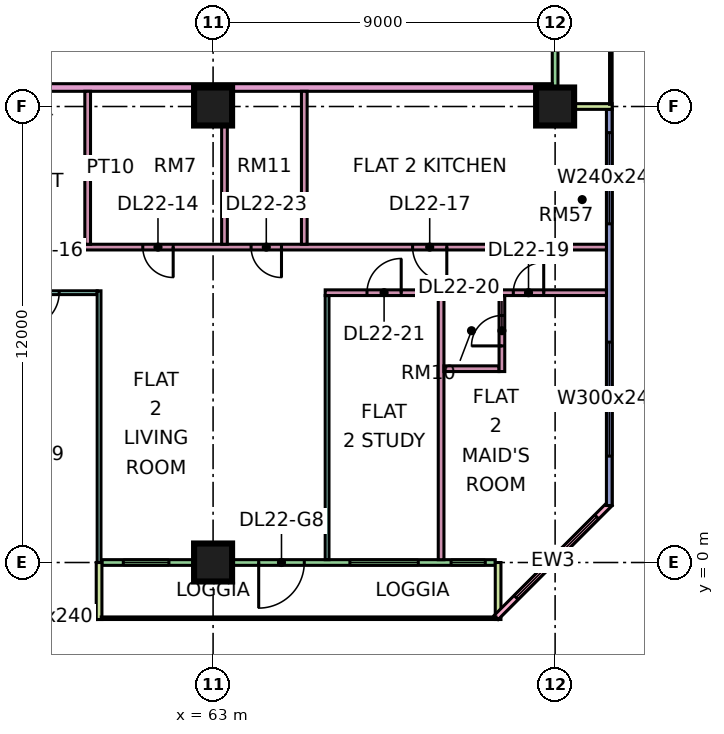
"""IFC4 building model, lengths in metres.
Left out: names, types, materials, properties, quantities, classifications, styles, units other than length and angle.
Written with IfcOpenShell. Run it as: python <this file> out.ifc"""

import sys

from ifc_helpers import new_model, si_unit, direction, frame, frame_2d, origin, origin_2d, place, context, subcontext, project, spatial, rectangle, extrude, element, fill, save


model = new_model("IFC4")
c1 = context("Model", 3, precision=1e-05, world=origin(), true_north=direction((0.0, 1.0)))
c2 = subcontext(c1, "Body", "Model", "MODEL_VIEW")
j1 = project(units=[si_unit("LENGTHUNIT", "METRE"), si_unit("PLANEANGLEUNIT", "RADIAN")], contexts=[c1])
p1 = place(None, origin())
s1 = spatial("IfcSite", under=j1, at=p1, CompositionType="ELEMENT")
p2 = place(p1, origin())
s2 = spatial("IfcBuilding", under=s1, at=p2, CompositionType="ELEMENT")
p3 = place(p2, frame((0.0, 0.0, 99.4)))
s3 = spatial("IfcBuildingStorey", under=s2, at=p3, CompositionType="ELEMENT", Elevation=99.4)
for number, where, z_axis, x_axis in (
    (1, (63.0, 0.0, 0.0), (0.0, 0.0, 1.0), (1.0, 0.0, 0.0)),
    (2, (63.0, 12.0, 0.0), (0.0, 0.0, 1.0), (1.0, 0.0, 0.0)),
    (3, (72.0, 12.0, 0.0), (0.0, 0.0, 1.0), (1.0, 0.0, 0.0)),
):
    element("IfcColumn", number, at=place(p3, frame(where, z_axis=z_axis, x_axis=x_axis)), inside=s3, PredefinedType="COLUMN", context=c2, shape_type="SweptSolid", body=[
        extrude(rectangle(XDim=1.0, YDim=1.0, at=origin_2d()), origin(), (0.0, 0.0, 1.0), 3.75),
    ])
p4 = place(p3, frame((48.075, -1.425, 0.0), z_axis=(0.0, 0.0, 1.0), x_axis=(1.0, 0.0, 0.0)))
e4 = element("IfcWall", 4, at=p4, inside=s3, PredefinedType="SOLIDWALL", context=c2, shape_type="SweptSolid", body=[
    extrude(rectangle(XDim=11.85, YDim=0.15, at=frame_2d((5.925, 0.0))), origin(), (0.0, 0.0, 1.0), 3.35),
])
p5 = place(p4, frame((0.562, 0.0, 0.45)))
e5 = element("IfcOpeningElement", 5, at=p5, cuts=e4, PredefinedType="OPENING", context=c2, shape_type="SweptSolid", body=[
    extrude(rectangle(XDim=1.8, YDim=2.4, at=frame_2d((0.9, 1.2))), frame((0.0, 0.085, 0.0), z_axis=(0.0, -1.0, 0.0), x_axis=(1.0, 0.0, 0.0)), (0.0, 0.0, 1.0), 0.17),
])
p6 = place(p4, frame((3.525, 0.0, 0.45)))
e6 = element("IfcOpeningElement", 6, at=p6, cuts=e4, PredefinedType="OPENING", context=c2, shape_type="SweptSolid", body=[
    extrude(rectangle(XDim=1.8, YDim=2.4, at=frame_2d((0.9, 1.2))), frame((0.0, 0.085, 0.0), z_axis=(0.0, -1.0, 0.0), x_axis=(1.0, 0.0, 0.0)), (0.0, 0.0, 1.0), 0.17),
])
p7 = place(p4, frame((6.525, 0.0, 0.45)))
e7 = element("IfcOpeningElement", 7, at=p7, cuts=e4, PredefinedType="OPENING", context=c2, shape_type="SweptSolid", body=[
    extrude(rectangle(XDim=1.8, YDim=2.4, at=frame_2d((0.9, 1.2))), frame((0.0, 0.085, 0.0), z_axis=(0.0, -1.0, 0.0), x_axis=(1.0, 0.0, 0.0)), (0.0, 0.0, 1.0), 0.17),
])
p8 = place(p4, frame((9.488, 0.0, 0.45)))
e8 = element("IfcOpeningElement", 8, at=p8, cuts=e4, PredefinedType="OPENING", context=c2, shape_type="SweptSolid", body=[
    extrude(rectangle(XDim=1.8, YDim=2.4, at=frame_2d((0.9, 1.2))), frame((0.0, 0.085, 0.0), z_axis=(0.0, -1.0, 0.0), x_axis=(1.0, 0.0, 0.0)), (0.0, 0.0, 1.0), 0.17),
])
p9 = place(p3, frame((60.075, 0.0, 0.0), z_axis=(0.0, 0.0, 1.0), x_axis=(1.0, 0.0, 0.0)))
e9 = element("IfcWall", 9, at=p9, inside=s3, PredefinedType="SOLIDWALL", context=c2, shape_type="SweptSolid", body=[
    extrude(rectangle(XDim=10.35, YDim=0.15, at=frame_2d((5.175, 0.0))), origin(), (0.0, 0.0, 1.0), 3.35),
])
p10 = place(p9, frame((0.562, 0.0, 0.45)))
e10 = element("IfcOpeningElement", 10, at=p10, cuts=e9, PredefinedType="OPENING", context=c2, shape_type="SweptSolid", body=[
    extrude(rectangle(XDim=1.2, YDim=2.4, at=frame_2d((0.6, 1.2))), frame((0.0, 0.085, 0.0), z_axis=(0.0, -1.0, 0.0), x_axis=(1.0, 0.0, 0.0)), (0.0, 0.0, 1.0), 0.17),
])
p11 = place(p9, frame((4.125, 0.0, 0.0)))
e11 = element("IfcOpeningElement", 11, at=p11, cuts=e9, PredefinedType="OPENING", context=c2, shape_type="SweptSolid", body=[
    extrude(rectangle(XDim=1.2, YDim=2.4, at=frame_2d((0.6, 1.2))), frame((0.0, 0.085, 0.0), z_axis=(0.0, -1.0, 0.0), x_axis=(1.0, 0.0, 0.0)), (0.0, 0.0, 1.0), 0.17),
])
p12 = place(p9, frame((6.525, 0.0, 0.45)))
e12 = element("IfcOpeningElement", 12, at=p12, cuts=e9, PredefinedType="OPENING", context=c2, shape_type="SweptSolid", body=[
    extrude(rectangle(XDim=1.8, YDim=2.4, at=frame_2d((0.9, 1.2))), frame((0.0, 0.085, 0.0), z_axis=(0.0, -1.0, 0.0), x_axis=(1.0, 0.0, 0.0)), (0.0, 0.0, 1.0), 0.17),
])
p13 = place(p9, frame((9.188, 0.0, 0.45)))
e13 = element("IfcOpeningElement", 13, at=p13, cuts=e9, PredefinedType="OPENING", context=c2, shape_type="SweptSolid", body=[
    extrude(rectangle(XDim=0.9, YDim=2.4, at=frame_2d((0.45, 1.2))), frame((0.0, 0.085, 0.0), z_axis=(0.0, -1.0, 0.0), x_axis=(1.0, 0.0, 0.0)), (0.0, 0.0, 1.0), 0.17),
])
for number, where, z_axis, x_axis in (
    (14, (60.0, -1.5, 0.0), (0.0, 0.0, 1.0), (0.0, 1.0, 0.0)),
    (15, (70.5, -1.5, 0.0), (0.0, 0.0, 1.0), (0.0, 1.0, 0.0)),
):
    element("IfcWall", number, at=place(p3, frame(where, z_axis=z_axis, x_axis=x_axis)), inside=s3, PredefinedType="SOLIDWALL", context=c2, shape_type="SweptSolid", body=[
        extrude(rectangle(XDim=1.5, YDim=0.15, at=frame_2d((0.75, 0.0))), origin(), (0.0, 0.0, 1.0), 3.35),
    ])
p14 = place(p3, frame((70.447, -1.447, 0.0), z_axis=(0.0, 0.0, 1.0), x_axis=(0.707106781187, 0.707106781187, 0.0)))
e16 = element("IfcWall", 16, at=p14, inside=s3, PredefinedType="SOLIDWALL", context=c2, shape_type="SweptSolid", body=[
    extrude(rectangle(XDim=4.243, YDim=0.15, at=frame_2d((2.121, 0.0))), origin(), (0.0, 0.0, 1.0), 3.35),
])
p15 = place(p14, frame((0.744, 0.0, 0.45)))
e17 = element("IfcOpeningElement", 17, at=p15, cuts=e16, PredefinedType="OPENING", context=c2, shape_type="SweptSolid", body=[
    extrude(rectangle(XDim=3.0, YDim=2.4, at=frame_2d((1.5, 1.2))), frame((0.0, 0.085, 0.0), z_axis=(0.0, -1.0, 0.0), x_axis=(1.0, 0.0, 0.0)), (0.0, 0.0, 1.0), 0.17),
])
p16 = place(p3, frame((73.425, 1.5, 0.0), z_axis=(0.0, 0.0, 1.0), x_axis=(0.0, 1.0, 0.0)))
e18 = element("IfcWall", 18, at=p16, inside=s3, PredefinedType="SOLIDWALL", context=c2, shape_type="SweptSolid", body=[
    extrude(rectangle(XDim=10.425, YDim=0.15, at=frame_2d((5.212, 0.0))), origin(), (0.0, 0.0, 1.0), 3.35),
])
p17 = place(p16, frame((1.3, 0.0, 0.45)))
e19 = element("IfcOpeningElement", 19, at=p17, cuts=e18, PredefinedType="OPENING", context=c2, shape_type="SweptSolid", body=[
    extrude(rectangle(XDim=3.0, YDim=2.4, at=frame_2d((1.5, 1.2))), frame((0.0, 0.085, 0.0), z_axis=(0.0, -1.0, 0.0), x_axis=(1.0, 0.0, 0.0)), (0.0, 0.0, 1.0), 0.17),
])
p18 = place(p16, frame((7.413, 0.0, 0.45)))
e20 = element("IfcOpeningElement", 20, at=p18, cuts=e18, PredefinedType="OPENING", context=c2, shape_type="SweptSolid", body=[
    extrude(rectangle(XDim=2.4, YDim=2.4, at=frame_2d((1.2, 1.2))), frame((0.0, 0.085, 0.0), z_axis=(0.0, -1.0, 0.0), x_axis=(1.0, 0.0, 0.0)), (0.0, 0.0, 1.0), 0.17),
])
p19 = place(p3, frame((72.0, 12.075, 0.0), z_axis=(0.0, 0.0, 1.0), x_axis=(0.0, 1.0, 0.0)))
e21 = element("IfcWall", 21, at=p19, inside=s3, PredefinedType="SOLIDWALL", context=c2, shape_type="SweptSolid", body=[
    extrude(rectangle(XDim=10.35, YDim=0.15, at=frame_2d((5.175, 0.0))), origin(), (0.0, 0.0, 1.0), 3.35),
])
p20 = place(p19, frame((4.575, 0.0, 0.0)))
e22 = element("IfcOpeningElement", 22, at=p20, cuts=e21, PredefinedType="OPENING", context=c2, shape_type="SweptSolid", body=[
    extrude(rectangle(XDim=1.8, YDim=2.4, at=frame_2d((0.9, 1.2))), frame((0.0, 0.085, 0.0), z_axis=(0.0, -1.0, 0.0), x_axis=(1.0, 0.0, 0.0)), (0.0, 0.0, 1.0), 0.17),
])
p21 = place(p19, frame((7.988, 0.0, 0.45)))
e23 = element("IfcOpeningElement", 23, at=p21, cuts=e21, PredefinedType="OPENING", context=c2, shape_type="SweptSolid", body=[
    extrude(rectangle(XDim=1.8, YDim=2.4, at=frame_2d((0.9, 1.2))), frame((0.0, 0.085, 0.0), z_axis=(0.0, -1.0, 0.0), x_axis=(1.0, 0.0, 0.0)), (0.0, 0.0, 1.0), 0.17),
])
p22 = place(p3, frame((73.5, 12.0, 0.0), z_axis=(0.0, 0.0, 1.0), x_axis=(-1.0, 0.0, 0.0)))
e24 = element("IfcWall", 24, at=p22, inside=s3, PredefinedType="SOLIDWALL", context=c2, shape_type="SweptSolid", body=[
    extrude(rectangle(XDim=1.5, YDim=0.15, at=frame_2d((0.75, 0.0))), origin(), (0.0, 0.0, 1.0), 3.35),
])
p23 = place(p3, frame((40.65, 12.5, 0.0), z_axis=(0.0, 0.0, 1.0), x_axis=(1.0, 0.0, 0.0)))
e25 = element("IfcWall", 25, at=p23, inside=s3, PredefinedType="PARTITIONING", context=c2, shape_type="SweptSolid", body=[
    extrude(rectangle(XDim=31.276, YDim=0.2, at=frame_2d((15.638, 0.0))), origin(), (0.0, 0.0, 1.0), 3.35),
])
p24 = place(p23, frame((14.25, 0.0, 0.0)))
e26 = element("IfcOpeningElement", 26, at=p24, cuts=e25, PredefinedType="OPENING", context=c2, shape_type="SweptSolid", body=[
    extrude(rectangle(XDim=1.0, YDim=2.1, at=frame_2d((0.5, 1.05))), frame((0.0, 0.11, 0.0), z_axis=(0.0, -1.0, 0.0), x_axis=(1.0, 0.0, 0.0)), (0.0, 0.0, 1.0), 0.22),
])
p25 = place(p23, frame((1.05, 0.0, 0.0)))
e27 = element("IfcOpeningElement", 27, at=p25, cuts=e25, PredefinedType="OPENING", context=c2, shape_type="SweptSolid", body=[
    extrude(rectangle(XDim=1.0, YDim=2.1, at=frame_2d((0.5, 1.05))), frame((0.0, 0.11, 0.0), z_axis=(0.0, -1.0, 0.0), x_axis=(1.0, 0.0, 0.0)), (0.0, 0.0, 1.0), 0.22),
])
p26 = place(p3, frame((54.1, 7.1, 0.0), z_axis=(0.0, 0.0, 1.0), x_axis=(1.0, 0.0, 0.0)))
e28 = element("IfcWall", 28, at=p26, inside=s3, PredefinedType="PARTITIONING", context=c2, shape_type="SweptSolid", body=[
    extrude(rectangle(XDim=5.85, YDim=0.1, at=frame_2d((2.925, 0.0))), origin(), (0.0, 0.0, 1.0), 3.35),
])
p27 = place(p26, frame((0.95, 0.0, 0.0)))
e29 = element("IfcOpeningElement", 29, at=p27, cuts=e28, PredefinedType="OPENING", context=c2, shape_type="SweptSolid", body=[
    extrude(rectangle(XDim=0.9, YDim=2.1, at=frame_2d((0.45, 1.05))), frame((0.0, 0.06, 0.0), z_axis=(0.0, -1.0, 0.0), x_axis=(1.0, 0.0, 0.0)), (0.0, 0.0, 1.0), 0.12),
])
p28 = place(p26, frame((3.95, 0.0, 0.0)))
e30 = element("IfcOpeningElement", 30, at=p28, cuts=e28, PredefinedType="OPENING", context=c2, shape_type="SweptSolid", body=[
    extrude(rectangle(XDim=0.9, YDim=2.1, at=frame_2d((0.45, 1.05))), frame((0.0, 0.06, 0.0), z_axis=(0.0, -1.0, 0.0), x_axis=(1.0, 0.0, 0.0)), (0.0, 0.0, 1.0), 0.12),
])
p29 = place(p3, frame((56.625, 8.3, 0.0), z_axis=(0.0, 0.0, 1.0), x_axis=(1.0, 0.0, 0.0)))
e31 = element("IfcWall", 31, at=p29, inside=s3, PredefinedType="PARTITIONING", context=c2, shape_type="SweptSolid", body=[
    extrude(rectangle(XDim=16.725, YDim=0.15, at=frame_2d((8.363, 0.0))), origin(), (0.0, 0.0, 1.0), 3.35),
])
p30 = place(p29, frame((4.525, 0.0, 0.0)))
e32 = element("IfcOpeningElement", 32, at=p30, cuts=e31, PredefinedType="OPENING", context=c2, shape_type="SweptSolid", body=[
    extrude(rectangle(XDim=0.8, YDim=2.1, at=frame_2d((0.4, 1.05))), frame((0.0, 0.085, 0.0), z_axis=(0.0, -1.0, 0.0), x_axis=(1.0, 0.0, 0.0)), (0.0, 0.0, 1.0), 0.17),
])
p31 = place(p29, frame((11.625, 0.0, 0.0)))
e33 = element("IfcOpeningElement", 33, at=p31, cuts=e31, PredefinedType="OPENING", context=c2, shape_type="SweptSolid", body=[
    extrude(rectangle(XDim=0.9, YDim=2.1, at=frame_2d((0.45, 1.05))), frame((0.0, 0.085, 0.0), z_axis=(0.0, -1.0, 0.0), x_axis=(1.0, 0.0, 0.0)), (0.0, 0.0, 1.0), 0.17),
])
p32 = place(p29, frame((7.375, 0.0, 0.0)))
e34 = element("IfcOpeningElement", 34, at=p32, cuts=e31, PredefinedType="OPENING", context=c2, shape_type="SweptSolid", body=[
    extrude(rectangle(XDim=0.8, YDim=2.1, at=frame_2d((0.4, 1.05))), frame((0.0, 0.085, 0.0), z_axis=(0.0, -1.0, 0.0), x_axis=(1.0, 0.0, 0.0)), (0.0, 0.0, 1.0), 0.17),
])
p33 = place(p3, frame((59.7, 8.375, 0.0), z_axis=(0.0, 0.0, 1.0), x_axis=(0.0, 1.0, 0.0)))
e35 = element("IfcWall", 35, at=p33, inside=s3, PredefinedType="PARTITIONING", context=c2, shape_type="SweptSolid", body=[
    extrude(rectangle(XDim=4.025, YDim=0.15, at=frame_2d((2.012, 0.0))), origin(), (0.0, 0.0, 1.0), 3.35),
])
p34 = place(p3, frame((60.0, 0.0, 0.0), z_axis=(0.0, 0.0, 1.0), x_axis=(0.0, 1.0, 0.0)))
e36 = element("IfcWall", 36, at=p34, inside=s3, PredefinedType="PARTITIONING", context=c2, shape_type="SweptSolid", body=[
    extrude(rectangle(XDim=7.15, YDim=0.1, at=frame_2d((3.575, 0.0))), origin(), (0.0, 0.0, 1.0), 3.35),
])
for number, where, z_axis, x_axis in (
    (37, (63.3, 8.375, 0.0), (0.0, 0.0, 1.0), (0.0, 1.0, 0.0)),
    (38, (65.4, 8.375, 0.0), (0.0, 0.0, 1.0), (0.0, 1.0, 0.0)),
):
    element("IfcWall", number, at=place(p3, frame(where, z_axis=z_axis, x_axis=x_axis)), inside=s3, PredefinedType="PARTITIONING", context=c2, shape_type="SweptSolid", body=[
        extrude(rectangle(XDim=4.025, YDim=0.15, at=frame_2d((2.012, 0.0))), origin(), (0.0, 0.0, 1.0), 3.35),
    ])
p35 = place(p3, frame((65.95, 7.1, 0.0), z_axis=(0.0, 0.0, 1.0), x_axis=(1.0, 0.0, 0.0)))
e39 = element("IfcWall", 39, at=p35, inside=s3, PredefinedType="PARTITIONING", context=c2, shape_type="SweptSolid", body=[
    extrude(rectangle(XDim=7.4, YDim=0.15, at=frame_2d((3.7, 0.0))), origin(), (0.0, 0.0, 1.0), 3.35),
])
p36 = place(p35, frame((4.95, 0.0, 0.0)))
e40 = element("IfcOpeningElement", 40, at=p36, cuts=e39, PredefinedType="OPENING", context=c2, shape_type="SweptSolid", body=[
    extrude(rectangle(XDim=0.8, YDim=2.1, at=frame_2d((0.4, 1.05))), frame((0.0, 0.085, 0.0), z_axis=(0.0, -1.0, 0.0), x_axis=(1.0, 0.0, 0.0)), (0.0, 0.0, 1.0), 0.17),
])
p37 = place(p35, frame((1.1, 0.0, 0.0)))
e41 = element("IfcOpeningElement", 41, at=p37, cuts=e39, PredefinedType="OPENING", context=c2, shape_type="SweptSolid", body=[
    extrude(rectangle(XDim=0.9, YDim=2.1, at=frame_2d((0.45, 1.05))), frame((0.0, 0.085, 0.0), z_axis=(0.0, -1.0, 0.0), x_axis=(1.0, 0.0, 0.0)), (0.0, 0.0, 1.0), 0.17),
])
p38 = place(p3, frame((66.0, 0.074, 0.0), z_axis=(0.0, 0.0, 1.0), x_axis=(0.0, 1.0, 0.0)))
e42 = element("IfcWall", 42, at=p38, inside=s3, PredefinedType="PARTITIONING", context=c2, shape_type="SweptSolid", body=[
    extrude(rectangle(XDim=6.951, YDim=0.1, at=frame_2d((3.476, 0.0))), origin(), (0.0, 0.0, 1.0), 3.35),
])
p39 = place(p3, frame((69.0, 0.074, 0.0), z_axis=(0.0, 0.0, 1.0), x_axis=(0.0, 1.0, 0.0)))
e43 = element("IfcWall", 43, at=p39, inside=s3, PredefinedType="PARTITIONING", context=c2, shape_type="SweptSolid", body=[
    extrude(rectangle(XDim=6.951, YDim=0.15, at=frame_2d((3.476, 0.0))), origin(), (0.0, 0.0, 1.0), 3.35),
])
p40 = place(p3, frame((69.075, 5.1, 0.0), z_axis=(0.0, 0.0, 1.0), x_axis=(1.0, 0.0, 0.0)))
e44 = element("IfcWall", 44, at=p40, inside=s3, PredefinedType="PARTITIONING", context=c2, shape_type="SweptSolid", body=[
    extrude(rectangle(XDim=1.45, YDim=0.15, at=frame_2d((0.725, 0.0))), origin(), (0.0, 0.0, 1.0), 3.35),
])
p41 = place(p3, frame((70.6, 5.025, 0.0), z_axis=(0.0, 0.0, 1.0), x_axis=(0.0, 1.0, 0.0)))
e45 = element("IfcWall", 45, at=p41, inside=s3, PredefinedType="PARTITIONING", context=c2, shape_type="SweptSolid", body=[
    extrude(rectangle(XDim=2.0, YDim=0.15, at=frame_2d((1.0, 0.0))), origin(), (0.0, 0.0, 1.0), 3.35),
])
p42 = place(p41, frame((0.675, 0.0, 0.0)))
e46 = element("IfcOpeningElement", 46, at=p42, cuts=e45, PredefinedType="OPENING", context=c2, shape_type="SweptSolid", body=[
    extrude(rectangle(XDim=0.8, YDim=2.1, at=frame_2d((0.4, 1.05))), frame((0.0, 0.085, 0.0), z_axis=(0.0, -1.0, 0.0), x_axis=(1.0, 0.0, 0.0)), (0.0, 0.0, 1.0), 0.17),
])
p43 = place(p8, origin())
e47 = element("IfcWindow", 47, at=p43, inside=s3, PartitioningType="SINGLE_PANEL", PredefinedType="WINDOW", context=c2, shape_type="SweptSolid", body=[
    extrude(rectangle(XDim=1.8, YDim=2.4, at=frame_2d((0.9, 1.2))), frame((0.0, 0.03, 0.0), z_axis=(0.0, -1.0, 0.0), x_axis=(1.0, 0.0, 0.0)), (0.0, 0.0, 1.0), 0.06),
])
fill(e8, e47)
p44 = place(p10, origin())
e48 = element("IfcWindow", 48, at=p44, inside=s3, PartitioningType="SINGLE_PANEL", PredefinedType="WINDOW", context=c2, shape_type="SweptSolid", body=[
    extrude(rectangle(XDim=1.2, YDim=2.4, at=frame_2d((0.6, 1.2))), frame((0.0, 0.03, 0.0), z_axis=(0.0, -1.0, 0.0), x_axis=(1.0, 0.0, 0.0)), (0.0, 0.0, 1.0), 0.06),
])
fill(e10, e48)
p45 = place(p11, frame((1.2, 0.0, 0.0), z_axis=(0.0, 0.0, 1.0), x_axis=(-1.0, 0.0, 0.0)))
e49 = element("IfcDoor", 49, at=p45, inside=s3, OperationType="DOUBLE_DOOR_SINGLE_SWING", PredefinedType="DOOR", context=c2, shape_type="SweptSolid", body=[
    extrude(rectangle(XDim=1.2, YDim=2.4, at=frame_2d((0.6, 1.2))), frame((0.0, 0.025, 0.0), z_axis=(0.0, -1.0, 0.0), x_axis=(1.0, 0.0, 0.0)), (0.0, 0.0, 1.0), 0.05),
])
fill(e11, e49)
p46 = place(p12, origin())
e50 = element("IfcWindow", 50, at=p46, inside=s3, PartitioningType="SINGLE_PANEL", PredefinedType="WINDOW", context=c2, shape_type="SweptSolid", body=[
    extrude(rectangle(XDim=1.8, YDim=2.4, at=frame_2d((0.9, 1.2))), frame((0.0, 0.03, 0.0), z_axis=(0.0, -1.0, 0.0), x_axis=(1.0, 0.0, 0.0)), (0.0, 0.0, 1.0), 0.06),
])
fill(e12, e50)
p47 = place(p13, origin())
e51 = element("IfcWindow", 51, at=p47, inside=s3, PartitioningType="SINGLE_PANEL", PredefinedType="WINDOW", context=c2, shape_type="SweptSolid", body=[
    extrude(rectangle(XDim=0.9, YDim=2.4, at=frame_2d((0.45, 1.2))), frame((0.0, 0.03, 0.0), z_axis=(0.0, -1.0, 0.0), x_axis=(1.0, 0.0, 0.0)), (0.0, 0.0, 1.0), 0.06),
])
fill(e13, e51)
p48 = place(p15, origin())
e52 = element("IfcWindow", 52, at=p48, inside=s3, PartitioningType="SINGLE_PANEL", PredefinedType="WINDOW", context=c2, shape_type="SweptSolid", body=[
    extrude(rectangle(XDim=3.0, YDim=2.4, at=frame_2d((1.5, 1.2))), frame((0.0, 0.03, 0.0), z_axis=(0.0, -1.0, 0.0), x_axis=(1.0, 0.0, 0.0)), (0.0, 0.0, 1.0), 0.06),
])
fill(e17, e52)
p49 = place(p17, origin())
e53 = element("IfcWindow", 53, at=p49, inside=s3, PartitioningType="SINGLE_PANEL", PredefinedType="WINDOW", context=c2, shape_type="SweptSolid", body=[
    extrude(rectangle(XDim=3.0, YDim=2.4, at=frame_2d((1.5, 1.2))), frame((0.0, 0.03, 0.0), z_axis=(0.0, -1.0, 0.0), x_axis=(1.0, 0.0, 0.0)), (0.0, 0.0, 1.0), 0.06),
])
fill(e19, e53)
p50 = place(p18, origin())
e54 = element("IfcWindow", 54, at=p50, inside=s3, PartitioningType="SINGLE_PANEL", PredefinedType="WINDOW", context=c2, shape_type="SweptSolid", body=[
    extrude(rectangle(XDim=2.4, YDim=2.4, at=frame_2d((1.2, 1.2))), frame((0.0, 0.03, 0.0), z_axis=(0.0, -1.0, 0.0), x_axis=(1.0, 0.0, 0.0)), (0.0, 0.0, 1.0), 0.06),
])
fill(e20, e54)
p51 = place(p30, origin())
e55 = element("IfcDoor", 55, at=p51, inside=s3, OperationType="SINGLE_SWING_RIGHT", PredefinedType="DOOR", context=c2, shape_type="SweptSolid", body=[
    extrude(rectangle(XDim=0.8, YDim=2.1, at=frame_2d((0.4, 1.05))), frame((0.0, 0.025, 0.0), z_axis=(0.0, -1.0, 0.0), x_axis=(1.0, 0.0, 0.0)), (0.0, 0.0, 1.0), 0.05),
])
fill(e32, e55)
p52 = place(p28, frame((0.9, 0.0, 0.0), z_axis=(0.0, 0.0, 1.0), x_axis=(-1.0, 0.0, 0.0)))
e56 = element("IfcDoor", 56, at=p52, inside=s3, OperationType="SINGLE_SWING_LEFT", PredefinedType="DOOR", context=c2, shape_type="SweptSolid", body=[
    extrude(rectangle(XDim=0.9, YDim=2.1, at=frame_2d((0.45, 1.05))), frame((0.0, 0.025, 0.0), z_axis=(0.0, -1.0, 0.0), x_axis=(1.0, 0.0, 0.0)), (0.0, 0.0, 1.0), 0.05),
])
fill(e30, e56)
p53 = place(p31, origin())
e57 = element("IfcDoor", 57, at=p53, inside=s3, OperationType="SINGLE_SWING_RIGHT", PredefinedType="DOOR", context=c2, shape_type="SweptSolid", body=[
    extrude(rectangle(XDim=0.9, YDim=2.1, at=frame_2d((0.45, 1.05))), frame((0.0, 0.025, 0.0), z_axis=(0.0, -1.0, 0.0), x_axis=(1.0, 0.0, 0.0)), (0.0, 0.0, 1.0), 0.05),
])
fill(e33, e57)
p54 = place(p36, frame((0.8, 0.0, 0.0), z_axis=(0.0, 0.0, 1.0), x_axis=(-1.0, 0.0, 0.0)))
e58 = element("IfcDoor", 58, at=p54, inside=s3, OperationType="SINGLE_SWING_RIGHT", PredefinedType="DOOR", context=c2, shape_type="SweptSolid", body=[
    extrude(rectangle(XDim=0.8, YDim=2.1, at=frame_2d((0.4, 1.05))), frame((0.0, 0.025, 0.0), z_axis=(0.0, -1.0, 0.0), x_axis=(1.0, 0.0, 0.0)), (0.0, 0.0, 1.0), 0.05),
])
fill(e40, e58)
p55 = place(p42, origin())
e59 = element("IfcDoor", 59, at=p55, inside=s3, OperationType="SINGLE_SWING_LEFT", PredefinedType="DOOR", context=c2, shape_type="SweptSolid", body=[
    extrude(rectangle(XDim=0.8, YDim=2.1, at=frame_2d((0.4, 1.05))), frame((0.0, 0.025, 0.0), z_axis=(0.0, -1.0, 0.0), x_axis=(1.0, 0.0, 0.0)), (0.0, 0.0, 1.0), 0.05),
])
fill(e46, e59)
p56 = place(p37, frame((0.9, 0.0, 0.0), z_axis=(0.0, 0.0, 1.0), x_axis=(-1.0, 0.0, 0.0)))
e60 = element("IfcDoor", 60, at=p56, inside=s3, OperationType="SINGLE_SWING_RIGHT", PredefinedType="DOOR", context=c2, shape_type="SweptSolid", body=[
    extrude(rectangle(XDim=0.9, YDim=2.1, at=frame_2d((0.45, 1.05))), frame((0.0, 0.025, 0.0), z_axis=(0.0, -1.0, 0.0), x_axis=(1.0, 0.0, 0.0)), (0.0, 0.0, 1.0), 0.05),
])
fill(e41, e60)
p57 = place(p32, origin())
e61 = element("IfcDoor", 61, at=p57, inside=s3, OperationType="SINGLE_SWING_RIGHT", PredefinedType="DOOR", context=c2, shape_type="SweptSolid", body=[
    extrude(rectangle(XDim=0.8, YDim=2.1, at=frame_2d((0.4, 1.05))), frame((0.0, 0.025, 0.0), z_axis=(0.0, -1.0, 0.0), x_axis=(1.0, 0.0, 0.0)), (0.0, 0.0, 1.0), 0.05),
])
fill(e34, e61)
save(model, sys.argv[1])
